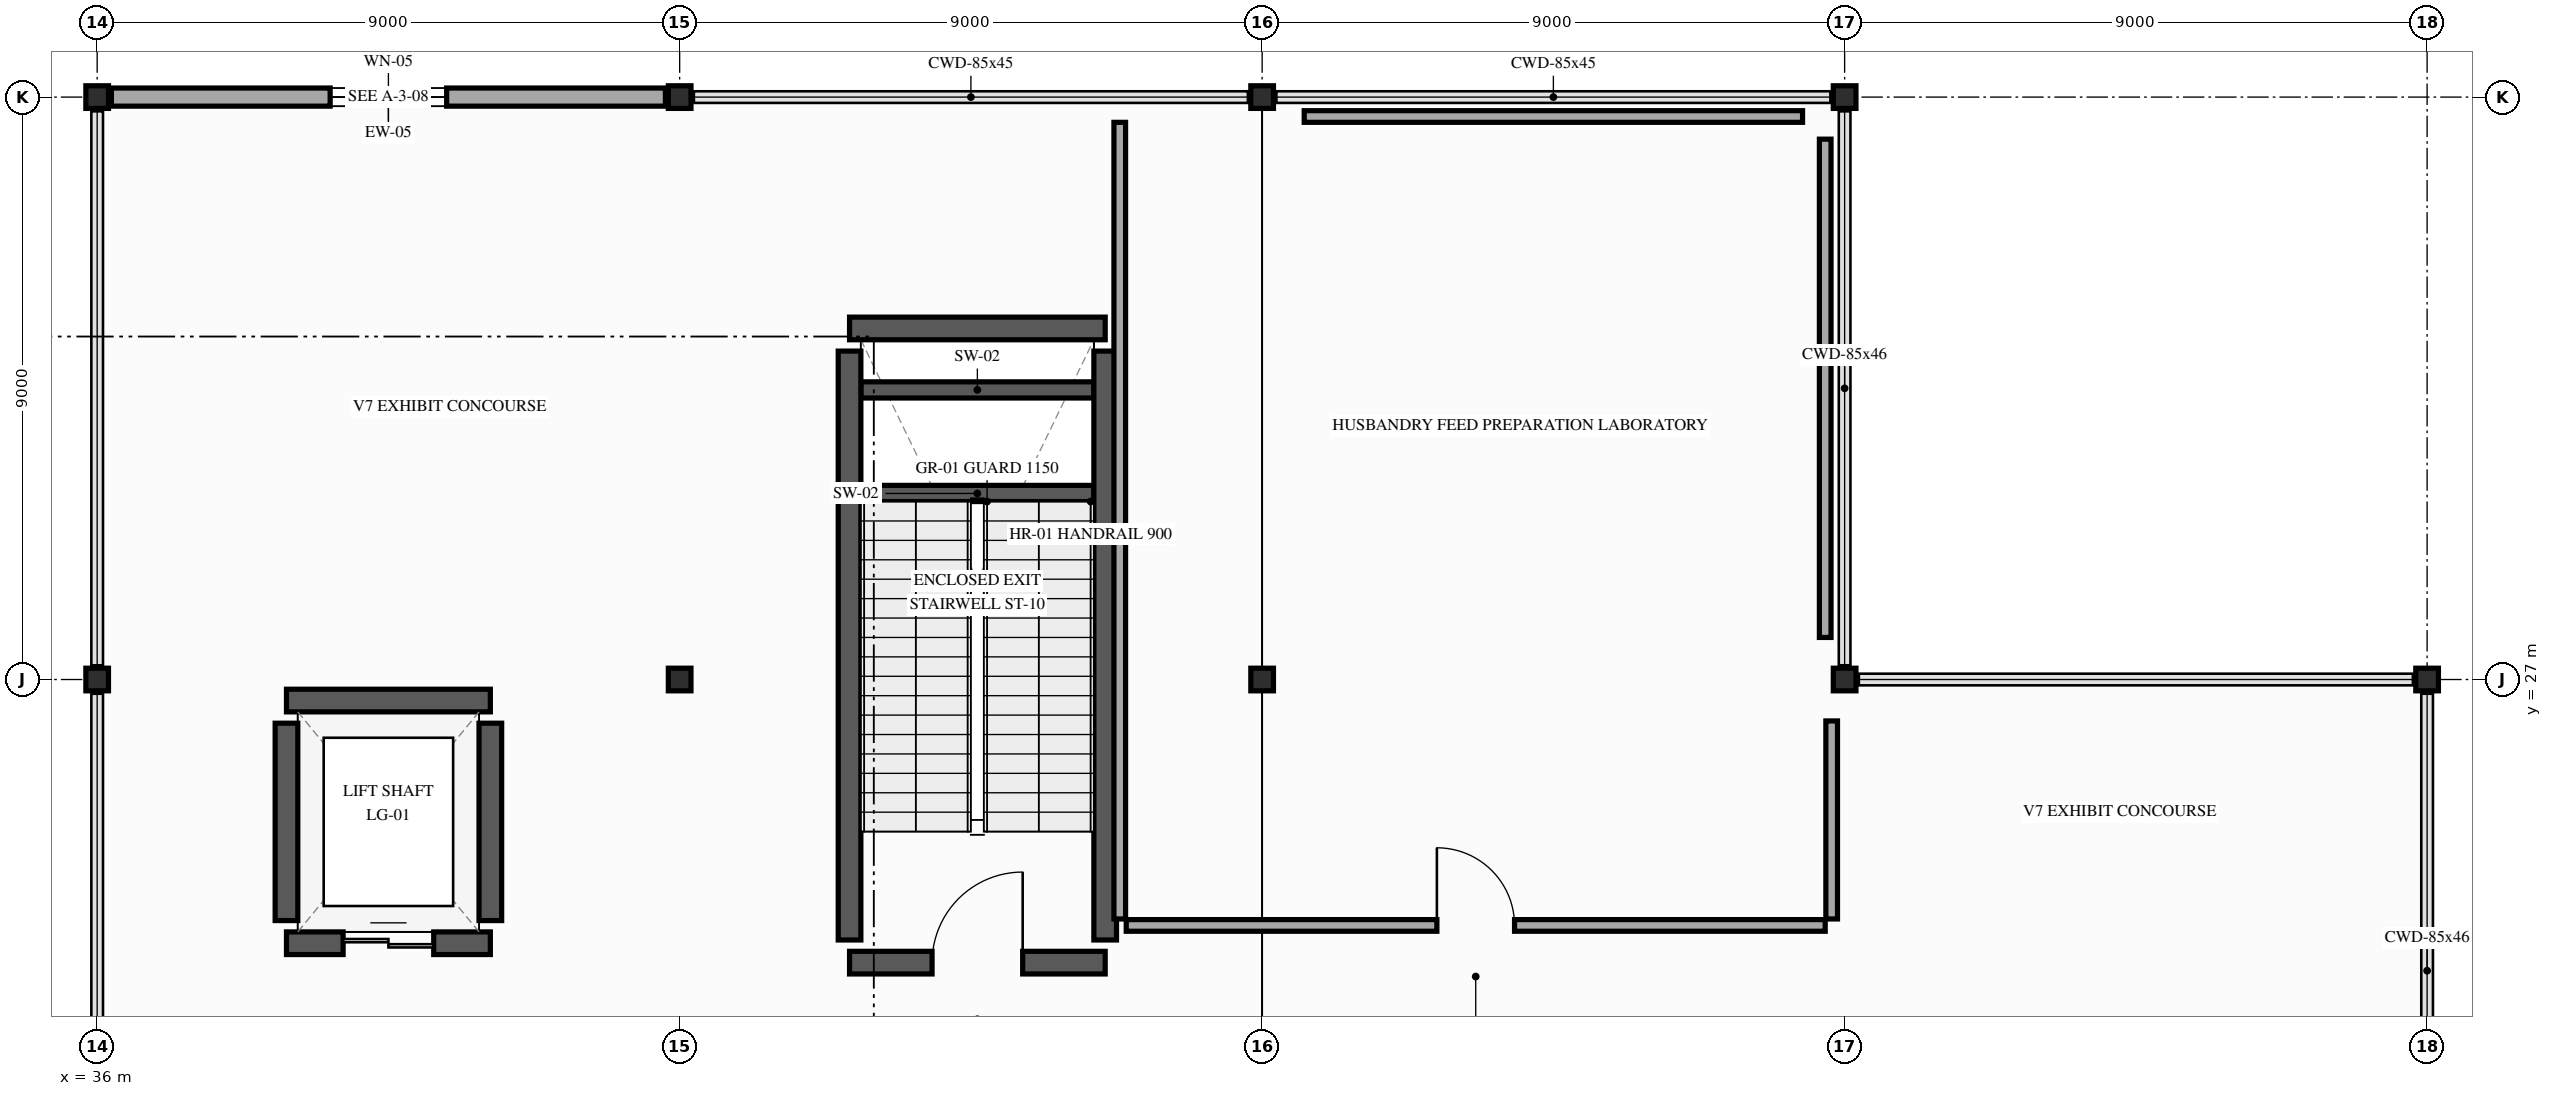
"""IFC4 building model, lengths in metres.
Left out: names, types, materials, properties, quantities, classifications, styles, units other than length and angle.
Written with IfcOpenShell. Run it as: python <this file> out.ifc"""

import sys

from ifc_helpers import new_model, si_unit, direction, frame, frame_2d, origin, origin_2d, place, context, subcontext, project, spatial, rectangle, i_section, extrude, element, fill, save


model = new_model("IFC4")
c1 = context("Model", 3, precision=1e-05, world=origin(), true_north=direction((0.0, 1.0)))
c2 = subcontext(c1, "Body", "Model", "MODEL_VIEW")
j1 = project(units=[si_unit("LENGTHUNIT", "METRE"), si_unit("PLANEANGLEUNIT", "RADIAN")], contexts=[c1])
p1 = place(None, origin())
s1 = spatial("IfcSite", under=j1, at=p1, CompositionType="ELEMENT")
p2 = place(p1, origin())
s2 = spatial("IfcBuilding", under=s1, at=p2, CompositionType="ELEMENT")
p3 = place(p2, frame((0.0, 0.0, 5.4)))
s3 = spatial("IfcBuildingStorey", under=s2, at=p3, CompositionType="ELEMENT", Elevation=5.4)
for number, where, z_axis, x_axis in (
    (1, (36.0, 27.0, 0.0), (0.0, 0.0, 1.0), (1.0, 0.0, 0.0)),
    (2, (36.0, 36.0, 0.0), (0.0, 0.0, 1.0), (1.0, 0.0, 0.0)),
    (3, (45.0, 27.0, 0.0), (0.0, 0.0, 1.0), (1.0, 0.0, 0.0)),
    (4, (45.0, 36.0, 0.0), (0.0, 0.0, 1.0), (1.0, 0.0, 0.0)),
    (5, (54.0, 27.0, 0.0), (0.0, 0.0, 1.0), (1.0, 0.0, 0.0)),
    (6, (54.0, 36.0, 0.0), (0.0, 0.0, 1.0), (1.0, 0.0, 0.0)),
    (7, (63.0, 27.0, 0.0), (0.0, 0.0, 1.0), (1.0, 0.0, 0.0)),
    (8, (63.0, 36.0, 0.0), (0.0, 0.0, 1.0), (1.0, 0.0, 0.0)),
    (9, (72.0, 27.0, 0.0), (0.0, 0.0, 1.0), (1.0, 0.0, 0.0)),
):
    element("IfcColumn", number, at=place(p3, frame(where, z_axis=z_axis, x_axis=x_axis)), inside=s3, PredefinedType="COLUMN", context=c2, shape_type="SweptSolid", body=[
        extrude(i_section(OverallWidth=0.35, OverallDepth=0.35, WebThickness=0.012, FlangeThickness=0.019, FilletRadius=0.02, at=origin_2d()), origin(), (0.0, 0.0, 1.0), 5.4),
    ])
p4 = place(p3, frame((36.22, 36.0, 0.0), z_axis=(0.0, 0.0, 1.0), x_axis=(1.0, 0.0, 0.0)))
e10 = element("IfcWall", 10, at=p4, inside=s3, PredefinedType="SOLIDWALL", context=c2, shape_type="SweptSolid", body=[
    extrude(rectangle(XDim=8.56, YDim=0.28, at=frame_2d((4.28, 0.0))), origin(), (0.0, 0.0, 1.0), 4.537),
])
p5 = place(p4, frame((3.38, 0.0, 0.9)))
e11 = element("IfcOpeningElement", 11, at=p5, cuts=e10, PredefinedType="OPENING", context=c2, shape_type="SweptSolid", body=[
    extrude(rectangle(XDim=1.8, YDim=2.6, at=frame_2d((0.9, 1.3))), frame((0.0, 0.15, 0.0), z_axis=(0.0, -1.0, 0.0), x_axis=(1.0, 0.0, 0.0)), (0.0, 0.0, 1.0), 0.3),
])
for number, where, z_axis, x_axis in (
    (12, (47.8, 29.875, 0.0), (0.0, 0.0, 1.0), (1.0, 0.0, 0.0)),
    (13, (47.8, 31.475, 0.0), (0.0, 0.0, 1.0), (1.0, 0.0, 0.0)),
):
    element("IfcWall", number, at=place(p3, frame(where, z_axis=z_axis, x_axis=x_axis)), inside=s3, PredefinedType="SHEAR", context=c2, shape_type="SweptSolid", body=[
        extrude(rectangle(XDim=3.6, YDim=0.25, at=frame_2d((1.8, 0.0))), origin(), (0.0, 0.0, 1.0), 2.5),
    ])
p6 = place(p3, frame((47.625, 22.625, 0.0), z_axis=(0.0, 0.0, 1.0), x_axis=(1.0, 0.0, 0.0)))
e14 = element("IfcWall", 14, at=p6, inside=s3, PredefinedType="SHEAR", context=c2, shape_type="SweptSolid", body=[
    extrude(rectangle(XDim=3.95, YDim=0.35, at=frame_2d((1.975, 0.0))), origin(), (0.0, 0.0, 1.0), 5.15),
])
p7 = place(p6, frame((1.275, 0.0, 0.0)))
e15 = element("IfcOpeningElement", 15, at=p7, cuts=e14, PredefinedType="OPENING", context=c2, shape_type="SweptSolid", body=[
    extrude(rectangle(XDim=1.4, YDim=2.2, at=frame_2d((0.7, 1.1))), frame((0.0, 0.185, 0.0), z_axis=(0.0, -1.0, 0.0), x_axis=(1.0, 0.0, 0.0)), (0.0, 0.0, 1.0), 0.37),
])
p8 = place(p3, frame((47.625, 32.425, 0.0), z_axis=(0.0, 0.0, 1.0), x_axis=(1.0, 0.0, 0.0)))
e16 = element("IfcWall", 16, at=p8, inside=s3, PredefinedType="SHEAR", context=c2, shape_type="SweptSolid", body=[
    extrude(rectangle(XDim=3.95, YDim=0.35, at=frame_2d((1.975, 0.0))), origin(), (0.0, 0.0, 1.0), 5.15),
])
for number, where, z_axis, x_axis in (
    (17, (47.625, 22.975, 0.0), (0.0, 0.0, 1.0), (0.0, 1.0, 0.0)),
    (18, (51.575, 22.975, 0.0), (0.0, 0.0, 1.0), (0.0, 1.0, 0.0)),
):
    element("IfcWall", number, at=place(p3, frame(where, z_axis=z_axis, x_axis=x_axis)), inside=s3, PredefinedType="SHEAR", context=c2, shape_type="SweptSolid", body=[
        extrude(rectangle(XDim=9.1, YDim=0.35, at=frame_2d((4.55, 0.0))), origin(), (0.0, 0.0, 1.0), 5.15),
    ])
p9 = place(p3, frame((38.925, 22.925, 0.0), z_axis=(0.0, 0.0, 1.0), x_axis=(1.0, 0.0, 0.0)))
e19 = element("IfcWall", 19, at=p9, inside=s3, PredefinedType="SHEAR", context=c2, shape_type="SweptSolid", body=[
    extrude(rectangle(XDim=3.15, YDim=0.35, at=frame_2d((1.575, 0.0))), origin(), (0.0, 0.0, 1.0), 5.15),
])
p10 = place(p9, frame((0.875, 0.0, 0.0)))
e20 = element("IfcOpeningElement", 20, at=p10, cuts=e19, PredefinedType="OPENING", context=c2, shape_type="SweptSolid", body=[
    extrude(rectangle(XDim=1.4, YDim=2.3, at=frame_2d((0.7, 1.15))), frame((0.0, 0.185, 0.0), z_axis=(0.0, -1.0, 0.0), x_axis=(1.0, 0.0, 0.0)), (0.0, 0.0, 1.0), 0.37),
])
p11 = place(p3, frame((42.075, 26.675, 0.0), z_axis=(0.0, 0.0, 1.0), x_axis=(-1.0, 0.0, 0.0)))
e21 = element("IfcWall", 21, at=p11, inside=s3, PredefinedType="SHEAR", context=c2, shape_type="SweptSolid", body=[
    extrude(rectangle(XDim=3.15, YDim=0.35, at=frame_2d((1.575, 0.0))), origin(), (0.0, 0.0, 1.0), 5.15),
])
for number, where, z_axis, x_axis in (
    (22, (38.925, 23.275, 0.0), (0.0, 0.0, 1.0), (0.0, 1.0, 0.0)),
    (23, (42.075, 23.275, 0.0), (0.0, 0.0, 1.0), (0.0, 1.0, 0.0)),
):
    element("IfcWall", number, at=place(p3, frame(where, z_axis=z_axis, x_axis=x_axis)), inside=s3, PredefinedType="SHEAR", context=c2, shape_type="SweptSolid", body=[
        extrude(rectangle(XDim=3.05, YDim=0.35, at=frame_2d((1.525, 0.0))), origin(), (0.0, 0.0, 1.0), 5.15),
    ])
p12 = place(p3, frame((51.8, 35.61, 0.0), z_axis=(0.0, 0.0, 1.0), x_axis=(0.0, -1.0, 0.0)))
e24 = element("IfcWall", 24, at=p12, inside=s3, PredefinedType="PARTITIONING", context=c2, shape_type="SweptSolid", body=[
    extrude(rectangle(XDim=12.31, YDim=0.18, at=frame_2d((6.155, 0.0))), origin(), (0.0, 0.0, 1.0), 4.537),
])
p13 = place(p3, frame((51.9, 23.2, 0.0), z_axis=(0.0, 0.0, 1.0), x_axis=(1.0, 0.0, 0.0)))
e25 = element("IfcWall", 25, at=p13, inside=s3, PredefinedType="PARTITIONING", context=c2, shape_type="SweptSolid", body=[
    extrude(rectangle(XDim=10.8, YDim=0.18, at=frame_2d((5.4, 0.0))), origin(), (0.0, 0.0, 1.0), 4.637),
])
p14 = place(p13, frame((4.8, 0.0, 0.0)))
e26 = element("IfcOpeningElement", 26, at=p14, cuts=e25, PredefinedType="OPENING", context=c2, shape_type="SweptSolid", body=[
    extrude(rectangle(XDim=1.2, YDim=2.2, at=frame_2d((0.6, 1.1))), frame((0.0, 0.1, 0.0), z_axis=(0.0, -1.0, 0.0), x_axis=(1.0, 0.0, 0.0)), (0.0, 0.0, 1.0), 0.2),
])
p15 = place(p3, frame((62.8, 23.3, 0.0), z_axis=(0.0, 0.0, 1.0), x_axis=(0.0, 1.0, 0.0)))
e27 = element("IfcWall", 27, at=p15, inside=s3, PredefinedType="PARTITIONING", context=c2, shape_type="SweptSolid", body=[
    extrude(rectangle(XDim=3.06, YDim=0.18, at=frame_2d((1.53, 0.0))), origin(), (0.0, 0.0, 1.0), 4.625),
])
p16 = place(p3, frame((62.7, 27.65, 0.0), z_axis=(0.0, 0.0, 1.0), x_axis=(0.0, 1.0, 0.0)))
e28 = element("IfcWall", 28, at=p16, inside=s3, PredefinedType="PARTITIONING", context=c2, shape_type="SweptSolid", body=[
    extrude(rectangle(XDim=7.7, YDim=0.18, at=frame_2d((3.85, 0.0))), origin(), (0.0, 0.0, 1.0), 4.625),
])
p17 = place(p3, frame((62.35, 35.7, 0.0), z_axis=(0.0, 0.0, 1.0), x_axis=(-1.0, 0.0, 0.0)))
e29 = element("IfcWall", 29, at=p17, inside=s3, PredefinedType="PARTITIONING", context=c2, shape_type="SweptSolid", body=[
    extrude(rectangle(XDim=7.7, YDim=0.18, at=frame_2d((3.85, 0.0))), origin(), (0.0, 0.0, 1.0), 4.537),
])
p18 = place(p5, origin())
e30 = element("IfcWindow", 30, at=p18, inside=s3, PartitioningType="SINGLE_PANEL", PredefinedType="WINDOW", context=c2, shape_type="SweptSolid", body=[
    extrude(rectangle(XDim=1.8, YDim=2.6, at=frame_2d((0.9, 1.3))), frame((0.0, 0.03, 0.0), z_axis=(0.0, -1.0, 0.0), x_axis=(1.0, 0.0, 0.0)), (0.0, 0.0, 1.0), 0.06),
])
fill(e11, e30)
p19 = place(p7, origin())
e31 = element("IfcDoor", 31, at=p19, inside=s3, OperationType="SINGLE_SWING_RIGHT", PredefinedType="DOOR", context=c2, shape_type="SweptSolid", body=[
    extrude(rectangle(XDim=1.4, YDim=2.2, at=frame_2d((0.7, 1.1))), frame((0.0, 0.025, 0.0), z_axis=(0.0, -1.0, 0.0), x_axis=(1.0, 0.0, 0.0)), (0.0, 0.0, 1.0), 0.05),
])
fill(e15, e31)
p20 = place(p10, origin())
e32 = element("IfcDoor", 32, at=p20, inside=s3, OperationType="DOUBLE_DOOR_SLIDING", PredefinedType="DOOR", context=c2, shape_type="SweptSolid", body=[
    extrude(rectangle(XDim=1.4, YDim=2.3, at=frame_2d((0.7, 1.15))), frame((0.0, 0.025, 0.0), z_axis=(0.0, -1.0, 0.0), x_axis=(1.0, 0.0, 0.0)), (0.0, 0.0, 1.0), 0.05),
])
fill(e20, e32)
p21 = place(p14, origin())
e33 = element("IfcDoor", 33, at=p21, inside=s3, OperationType="SINGLE_SWING_LEFT", PredefinedType="DOOR", context=c2, shape_type="SweptSolid", body=[
    extrude(rectangle(XDim=1.2, YDim=2.2, at=frame_2d((0.6, 1.1))), frame((0.0, 0.025, 0.0), z_axis=(0.0, -1.0, 0.0), x_axis=(1.0, 0.0, 0.0)), (0.0, 0.0, 1.0), 0.05),
])
fill(e26, e33)
save(model, sys.argv[1])
